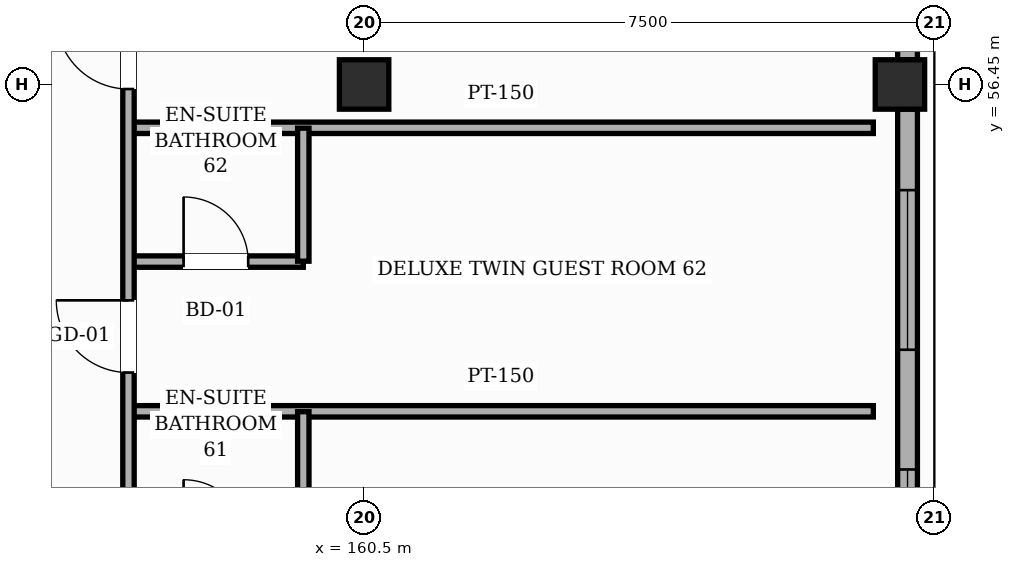
"""IFC4 building model, lengths in metres.
Left out: names, types, materials, properties, quantities, classifications, styles, units other than length and angle.
Written with IfcOpenShell. Run it as: python <this file> out.ifc"""

import sys

from ifc_helpers import new_model, si_unit, direction, frame, frame_2d, origin, origin_2d, place, context, subcontext, project, spatial, rectangle, hollow_rectangle, extrude, element, fill, save


model = new_model("IFC4")
c1 = context("Model", 3, precision=1e-05, world=origin(), true_north=direction((0.0, 1.0)))
c2 = subcontext(c1, "Body", "Model", "MODEL_VIEW")
j1 = project(units=[si_unit("LENGTHUNIT", "METRE"), si_unit("PLANEANGLEUNIT", "RADIAN")], contexts=[c1])
p1 = place(None, origin())
s1 = spatial("IfcSite", under=j1, at=p1, CompositionType="ELEMENT")
p2 = place(p1, origin())
s2 = spatial("IfcBuilding", under=s1, at=p2, CompositionType="ELEMENT")
p3 = place(p2, frame((0.0, 0.0, 19.8)))
s3 = spatial("IfcBuildingStorey", under=s2, at=p3, CompositionType="ELEMENT", Elevation=19.8)
for number, where, z_axis, x_axis in (
    (1, (160.5, 56.45, 0.0), (0.0, 0.0, 1.0), (1.0, 0.0, 0.0)),
    (2, (167.55, 56.45, 0.0), (0.0, 0.0, 1.0), (1.0, 0.0, 0.0)),
):
    element("IfcColumn", number, at=place(p3, frame(where, z_axis=z_axis, x_axis=x_axis)), inside=s3, PredefinedType="COLUMN", context=c2, shape_type="SweptSolid", body=[
        extrude(hollow_rectangle(XDim=0.65, YDim=0.65, WallThickness=0.025, InnerFilletRadius=0.025, OuterFilletRadius=0.05, at=origin_2d()), origin(), (0.0, 0.0, 1.0), 4.8),
    ])
p4 = place(p3, frame((167.65, 56.125, 0.0), z_axis=(0.0, 0.0, 1.0), x_axis=(0.0, -1.0, 0.0)))
e3 = element("IfcWall", 3, at=p4, inside=s3, PredefinedType="SOLIDWALL", context=c2, shape_type="SweptSolid", body=[
    extrude(rectangle(XDim=7.35, YDim=0.26, at=frame_2d((3.675, 0.0))), origin(), (0.0, 0.0, 1.0), 3.905),
])
p5 = place(p4, frame((4.74, 0.0, 0.85)))
e4 = element("IfcOpeningElement", 4, at=p5, cuts=e3, PredefinedType="OPENING", context=c2, shape_type="SweptSolid", body=[
    extrude(rectangle(XDim=1.85, YDim=1.95, at=frame_2d((0.925, 0.975))), frame((0.0, 0.14, 0.0), z_axis=(0.0, -1.0, 0.0), x_axis=(1.0, 0.0, 0.0)), (0.0, 0.0, 1.0), 0.28),
])
p6 = place(p4, frame((1.065, 0.0, 0.85)))
e5 = element("IfcOpeningElement", 5, at=p6, cuts=e3, PredefinedType="OPENING", context=c2, shape_type="SweptSolid", body=[
    extrude(rectangle(XDim=2.1, YDim=1.95, at=frame_2d((1.05, 0.975))), frame((0.0, 0.14, 0.0), z_axis=(0.0, -1.0, 0.0), x_axis=(1.0, 0.0, 0.0)), (0.0, 0.0, 1.0), 0.28),
])
p7 = place(p3, frame((167.65, 64.125, 0.0), z_axis=(0.0, 0.0, 1.0), x_axis=(0.0, -1.0, 0.0)))
e6 = element("IfcWall", 6, at=p7, inside=s3, PredefinedType="SOLIDWALL", context=c2, shape_type="SweptSolid", body=[
    extrude(rectangle(XDim=7.35, YDim=0.26, at=frame_2d((3.675, 0.0))), origin(), (0.0, 0.0, 1.0), 3.905),
])
p8 = place(p7, frame((5.31, 0.0, 0.85)))
e7 = element("IfcOpeningElement", 7, at=p8, cuts=e6, PredefinedType="OPENING", context=c2, shape_type="SweptSolid", body=[
    extrude(rectangle(XDim=1.25, YDim=1.35, at=frame_2d((0.625, 0.675))), frame((0.0, 0.14, 0.0), z_axis=(0.0, -1.0, 0.0), x_axis=(1.0, 0.0, 0.0)), (0.0, 0.0, 1.0), 0.28),
])
p9 = place(p7, frame((1.925, 0.0, 0.85)))
e8 = element("IfcOpeningElement", 8, at=p9, cuts=e6, PredefinedType="OPENING", context=c2, shape_type="SweptSolid", body=[
    extrude(rectangle(XDim=1.45, YDim=1.35, at=frame_2d((0.725, 0.675))), frame((0.0, 0.14, 0.0), z_axis=(0.0, -1.0, 0.0), x_axis=(1.0, 0.0, 0.0)), (0.0, 0.0, 1.0), 0.28),
])
p10 = place(p3, frame((157.4, 52.15, 0.0), z_axis=(0.0, 0.0, 1.0), x_axis=(1.0, 0.0, 0.0)))
e9 = element("IfcWall", 9, at=p10, inside=s3, PredefinedType="PARTITIONING", context=c2, shape_type="SweptSolid", body=[
    extrude(rectangle(XDim=9.8, YDim=0.15, at=frame_2d((4.9, 0.0))), origin(), (0.0, 0.0, 1.0), 4.565),
])
p11 = place(p3, frame((157.4, 54.12, 0.0), z_axis=(0.0, 0.0, 1.0), x_axis=(1.0, 0.0, 0.0)))
e10 = element("IfcWall", 10, at=p11, inside=s3, PredefinedType="PARTITIONING", context=c2, shape_type="SweptSolid", body=[
    extrude(rectangle(XDim=2.3, YDim=0.15, at=frame_2d((1.15, 0.0))), origin(), (0.0, 0.0, 1.0), 4.565),
])
p12 = place(p11, frame((0.725, 0.0, 0.0)))
e11 = element("IfcOpeningElement", 11, at=p12, cuts=e10, PredefinedType="OPENING", context=c2, shape_type="SweptSolid", body=[
    extrude(rectangle(XDim=0.85, YDim=2.1, at=frame_2d((0.425, 1.05))), frame((0.0, 0.085, 0.0), z_axis=(0.0, -1.0, 0.0), x_axis=(1.0, 0.0, 0.0)), (0.0, 0.0, 1.0), 0.17),
])
p13 = place(p3, frame((157.4, 55.88, 0.0), z_axis=(0.0, 0.0, 1.0), x_axis=(1.0, 0.0, 0.0)))
e12 = element("IfcWall", 12, at=p13, inside=s3, PredefinedType="PARTITIONING", context=c2, shape_type="SweptSolid", body=[
    extrude(rectangle(XDim=9.8, YDim=0.15, at=frame_2d((4.9, 0.0))), origin(), (0.0, 0.0, 1.0), 4.565),
])
p14 = place(p3, frame((157.4, 22.3, 0.0), z_axis=(0.0, 0.0, 1.0), x_axis=(0.0, 1.0, 0.0)))
e13 = element("IfcWall", 13, at=p14, inside=s3, PredefinedType="PARTITIONING", context=c2, shape_type="SweptSolid", body=[
    extrude(rectangle(XDim=48.5, YDim=0.15, at=frame_2d((24.25, 0.0))), origin(), (0.0, 0.0, 1.0), 4.565),
])
p15 = place(p14, frame((0.515, 0.0, 0.0)))
e14 = element("IfcOpeningElement", 14, at=p15, cuts=e13, PredefinedType="OPENING", context=c2, shape_type="SweptSolid", body=[
    extrude(rectangle(XDim=0.95, YDim=2.15, at=frame_2d((0.475, 1.075))), frame((0.0, 0.085, 0.0), z_axis=(0.0, -1.0, 0.0), x_axis=(1.0, 0.0, 0.0)), (0.0, 0.0, 1.0), 0.17),
])
p16 = place(p14, frame((4.245, 0.0, 0.0)))
e15 = element("IfcOpeningElement", 15, at=p16, cuts=e13, PredefinedType="OPENING", context=c2, shape_type="SweptSolid", body=[
    extrude(rectangle(XDim=0.95, YDim=2.15, at=frame_2d((0.475, 1.075))), frame((0.0, 0.085, 0.0), z_axis=(0.0, -1.0, 0.0), x_axis=(1.0, 0.0, 0.0)), (0.0, 0.0, 1.0), 0.17),
])
p17 = place(p14, frame((7.975, 0.0, 0.0)))
e16 = element("IfcOpeningElement", 16, at=p17, cuts=e13, PredefinedType="OPENING", context=c2, shape_type="SweptSolid", body=[
    extrude(rectangle(XDim=0.95, YDim=2.15, at=frame_2d((0.475, 1.075))), frame((0.0, 0.085, 0.0), z_axis=(0.0, -1.0, 0.0), x_axis=(1.0, 0.0, 0.0)), (0.0, 0.0, 1.0), 0.17),
])
p18 = place(p14, frame((11.71, 0.0, 0.0)))
e17 = element("IfcOpeningElement", 17, at=p18, cuts=e13, PredefinedType="OPENING", context=c2, shape_type="SweptSolid", body=[
    extrude(rectangle(XDim=0.95, YDim=2.15, at=frame_2d((0.475, 1.075))), frame((0.0, 0.085, 0.0), z_axis=(0.0, -1.0, 0.0), x_axis=(1.0, 0.0, 0.0)), (0.0, 0.0, 1.0), 0.17),
])
p19 = place(p14, frame((15.44, 0.0, 0.0)))
e18 = element("IfcOpeningElement", 18, at=p19, cuts=e13, PredefinedType="OPENING", context=c2, shape_type="SweptSolid", body=[
    extrude(rectangle(XDim=0.95, YDim=2.15, at=frame_2d((0.475, 1.075))), frame((0.0, 0.085, 0.0), z_axis=(0.0, -1.0, 0.0), x_axis=(1.0, 0.0, 0.0)), (0.0, 0.0, 1.0), 0.17),
])
p20 = place(p14, frame((19.17, 0.0, 0.0)))
e19 = element("IfcOpeningElement", 19, at=p20, cuts=e13, PredefinedType="OPENING", context=c2, shape_type="SweptSolid", body=[
    extrude(rectangle(XDim=0.95, YDim=2.15, at=frame_2d((0.475, 1.075))), frame((0.0, 0.085, 0.0), z_axis=(0.0, -1.0, 0.0), x_axis=(1.0, 0.0, 0.0)), (0.0, 0.0, 1.0), 0.17),
])
p21 = place(p14, frame((22.9, 0.0, 0.0)))
e20 = element("IfcOpeningElement", 20, at=p21, cuts=e13, PredefinedType="OPENING", context=c2, shape_type="SweptSolid", body=[
    extrude(rectangle(XDim=0.95, YDim=2.15, at=frame_2d((0.475, 1.075))), frame((0.0, 0.085, 0.0), z_axis=(0.0, -1.0, 0.0), x_axis=(1.0, 0.0, 0.0)), (0.0, 0.0, 1.0), 0.17),
])
p22 = place(p14, frame((26.63, 0.0, 0.0)))
e21 = element("IfcOpeningElement", 21, at=p22, cuts=e13, PredefinedType="OPENING", context=c2, shape_type="SweptSolid", body=[
    extrude(rectangle(XDim=0.95, YDim=2.15, at=frame_2d((0.475, 1.075))), frame((0.0, 0.085, 0.0), z_axis=(0.0, -1.0, 0.0), x_axis=(1.0, 0.0, 0.0)), (0.0, 0.0, 1.0), 0.17),
])
p23 = place(p14, frame((30.36, 0.0, 0.0)))
e22 = element("IfcOpeningElement", 22, at=p23, cuts=e13, PredefinedType="OPENING", context=c2, shape_type="SweptSolid", body=[
    extrude(rectangle(XDim=0.95, YDim=2.15, at=frame_2d((0.475, 1.075))), frame((0.0, 0.085, 0.0), z_axis=(0.0, -1.0, 0.0), x_axis=(1.0, 0.0, 0.0)), (0.0, 0.0, 1.0), 0.17),
])
p24 = place(p14, frame((34.09, 0.0, 0.0)))
e23 = element("IfcOpeningElement", 23, at=p24, cuts=e13, PredefinedType="OPENING", context=c2, shape_type="SweptSolid", body=[
    extrude(rectangle(XDim=0.95, YDim=2.15, at=frame_2d((0.475, 1.075))), frame((0.0, 0.085, 0.0), z_axis=(0.0, -1.0, 0.0), x_axis=(1.0, 0.0, 0.0)), (0.0, 0.0, 1.0), 0.17),
])
p25 = place(p14, frame((37.825, 0.0, 0.0)))
e24 = element("IfcOpeningElement", 24, at=p25, cuts=e13, PredefinedType="OPENING", context=c2, shape_type="SweptSolid", body=[
    extrude(rectangle(XDim=0.95, YDim=2.15, at=frame_2d((0.475, 1.075))), frame((0.0, 0.085, 0.0), z_axis=(0.0, -1.0, 0.0), x_axis=(1.0, 0.0, 0.0)), (0.0, 0.0, 1.0), 0.17),
])
p26 = place(p14, frame((41.555, 0.0, 0.0)))
e25 = element("IfcOpeningElement", 25, at=p26, cuts=e13, PredefinedType="OPENING", context=c2, shape_type="SweptSolid", body=[
    extrude(rectangle(XDim=0.95, YDim=2.15, at=frame_2d((0.475, 1.075))), frame((0.0, 0.085, 0.0), z_axis=(0.0, -1.0, 0.0), x_axis=(1.0, 0.0, 0.0)), (0.0, 0.0, 1.0), 0.17),
])
p27 = place(p14, frame((45.285, 0.0, 0.0)))
e26 = element("IfcOpeningElement", 26, at=p27, cuts=e13, PredefinedType="OPENING", context=c2, shape_type="SweptSolid", body=[
    extrude(rectangle(XDim=0.95, YDim=2.15, at=frame_2d((0.475, 1.075))), frame((0.0, 0.085, 0.0), z_axis=(0.0, -1.0, 0.0), x_axis=(1.0, 0.0, 0.0)), (0.0, 0.0, 1.0), 0.17),
])
for number, where, z_axis, x_axis in (
    (27, (159.7, 50.395, 0.0), (0.0, 0.0, 1.0), (0.0, 1.0, 0.0)),
    (28, (159.7, 54.125, 0.0), (0.0, 0.0, 1.0), (0.0, 1.0, 0.0)),
):
    element("IfcWall", number, at=place(p3, frame(where, z_axis=z_axis, x_axis=x_axis)), inside=s3, PredefinedType="PARTITIONING", context=c2, shape_type="SweptSolid", body=[
        extrude(rectangle(XDim=1.75, YDim=0.15, at=frame_2d((0.875, 0.0))), origin(), (0.0, 0.0, 1.0), 4.565),
    ])
p28 = place(p5, origin())
e29 = element("IfcWindow", 29, at=p28, inside=s3, PartitioningType="SINGLE_PANEL", PredefinedType="WINDOW", context=c2, shape_type="SweptSolid", body=[
    extrude(rectangle(XDim=1.85, YDim=1.95, at=frame_2d((0.925, 0.975))), frame((0.0, 0.03, 0.0), z_axis=(0.0, -1.0, 0.0), x_axis=(1.0, 0.0, 0.0)), (0.0, 0.0, 1.0), 0.06),
])
fill(e4, e29)
p29 = place(p6, origin())
e30 = element("IfcWindow", 30, at=p29, inside=s3, PartitioningType="SINGLE_PANEL", PredefinedType="WINDOW", context=c2, shape_type="SweptSolid", body=[
    extrude(rectangle(XDim=2.1, YDim=1.95, at=frame_2d((1.05, 0.975))), frame((0.0, 0.03, 0.0), z_axis=(0.0, -1.0, 0.0), x_axis=(1.0, 0.0, 0.0)), (0.0, 0.0, 1.0), 0.06),
])
fill(e5, e30)
p30 = place(p23, origin())
e31 = element("IfcDoor", 31, at=p30, inside=s3, OperationType="SINGLE_SWING_RIGHT", PredefinedType="DOOR", context=c2, shape_type="SweptSolid", body=[
    extrude(rectangle(XDim=0.95, YDim=2.15, at=frame_2d((0.475, 1.075))), frame((0.0, 0.025, 0.0), z_axis=(0.0, -1.0, 0.0), x_axis=(1.0, 0.0, 0.0)), (0.0, 0.0, 1.0), 0.05),
])
fill(e22, e31)
p31 = place(p12, origin())
e32 = element("IfcDoor", 32, at=p31, inside=s3, OperationType="SINGLE_SWING_LEFT", PredefinedType="DOOR", context=c2, shape_type="SweptSolid", body=[
    extrude(rectangle(XDim=0.85, YDim=2.1, at=frame_2d((0.425, 1.05))), frame((0.0, 0.025, 0.0), z_axis=(0.0, -1.0, 0.0), x_axis=(1.0, 0.0, 0.0)), (0.0, 0.0, 1.0), 0.05),
])
fill(e11, e32)
p32 = place(p24, origin())
e33 = element("IfcDoor", 33, at=p32, inside=s3, OperationType="SINGLE_SWING_RIGHT", PredefinedType="DOOR", context=c2, shape_type="SweptSolid", body=[
    extrude(rectangle(XDim=0.95, YDim=2.15, at=frame_2d((0.475, 1.075))), frame((0.0, 0.025, 0.0), z_axis=(0.0, -1.0, 0.0), x_axis=(1.0, 0.0, 0.0)), (0.0, 0.0, 1.0), 0.05),
])
fill(e23, e33)
save(model, sys.argv[1])
